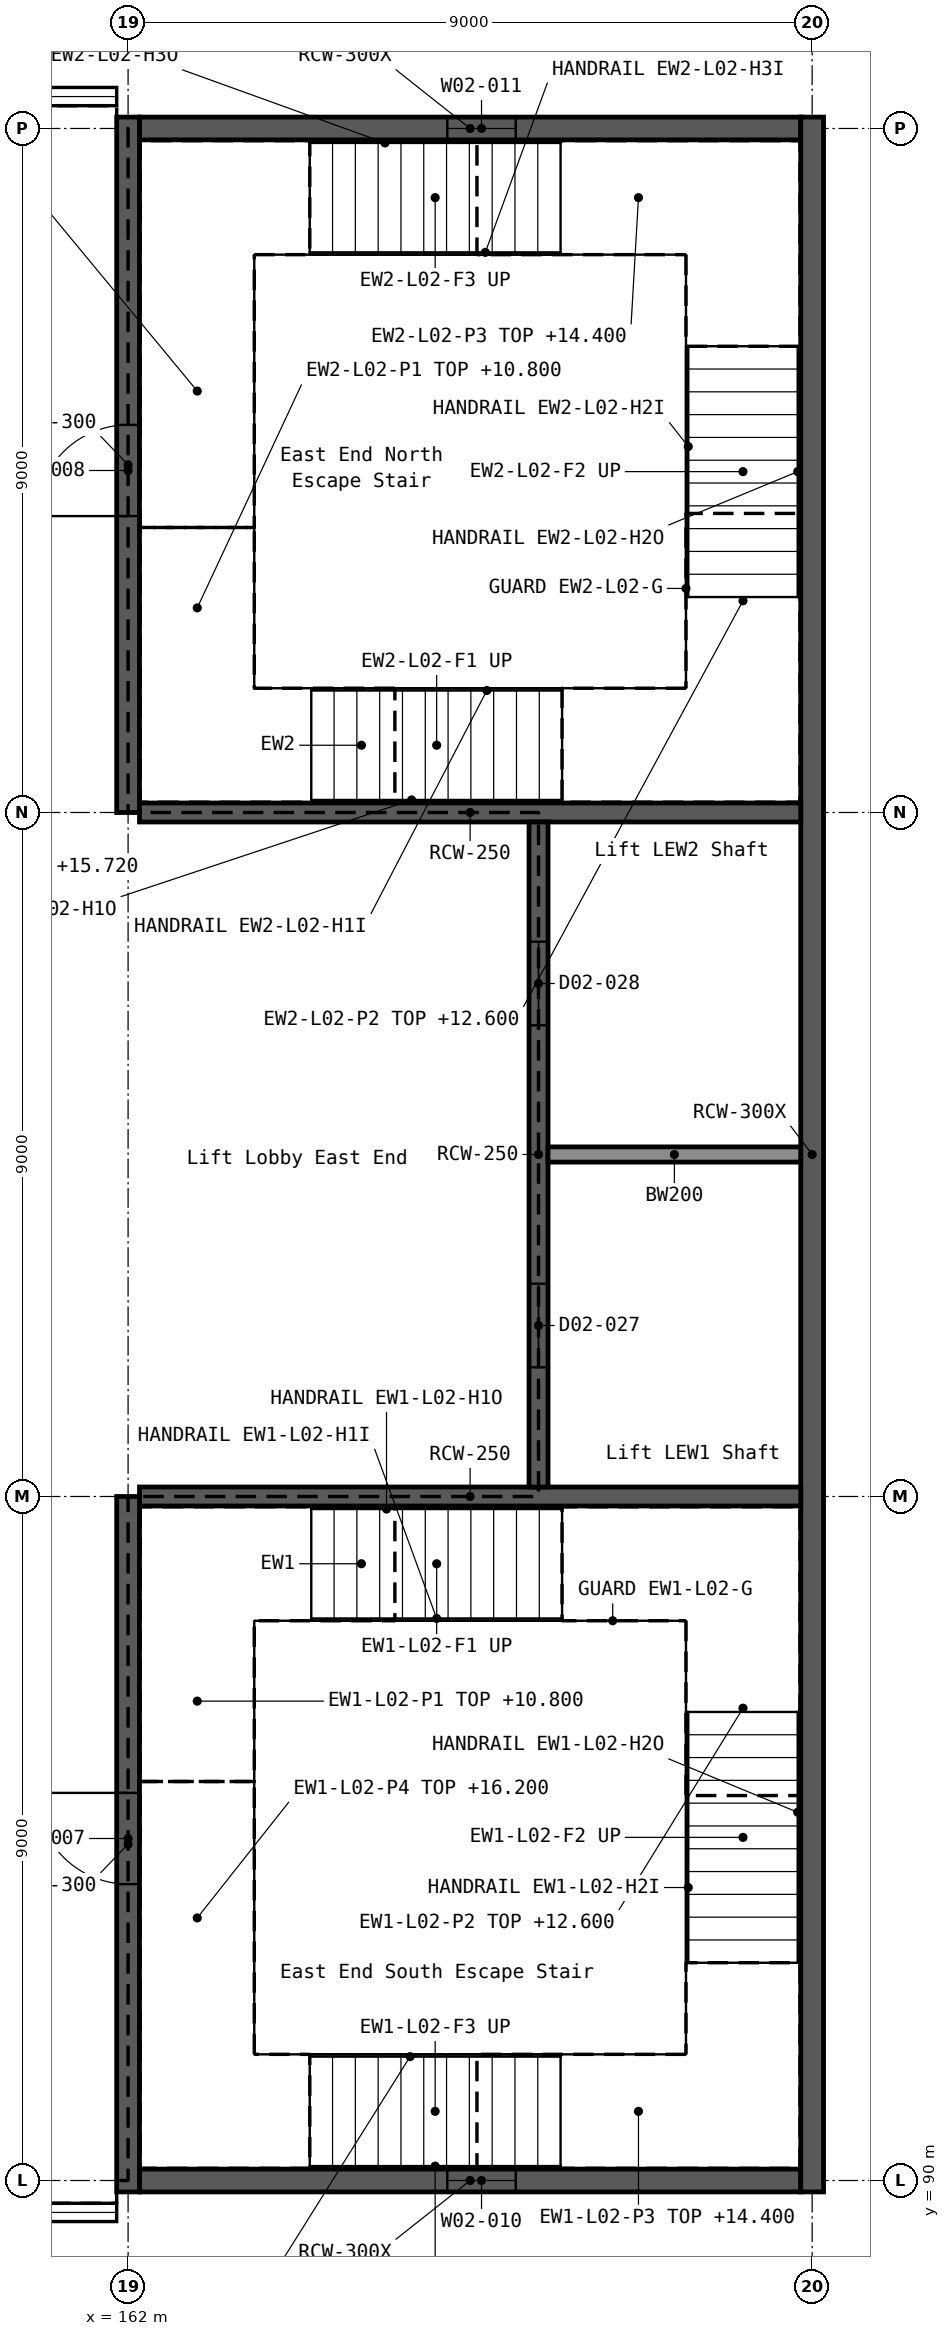
"""IFC4 building model, lengths in metres.
Left out: names, types, materials, properties, quantities, classifications, styles, units other than length and angle.
Written with IfcOpenShell. Run it as: python <this file> out.ifc"""

import sys

from ifc_helpers import new_model, si_unit, direction, frame, frame_2d, origin, place, context, subcontext, project, spatial, rectangle, extrude, element, fill, save


model = new_model("IFC4")
c1 = context("Model", 3, precision=1e-05, world=origin(), true_north=direction((0.0, 1.0)))
c2 = subcontext(c1, "Body", "Model", "MODEL_VIEW")
j1 = project(units=[si_unit("LENGTHUNIT", "METRE"), si_unit("PLANEANGLEUNIT", "RADIAN")], contexts=[c1])
p1 = place(None, origin())
s1 = spatial("IfcSite", under=j1, at=p1, CompositionType="ELEMENT")
p2 = place(p1, origin())
s2 = spatial("IfcBuilding", under=s1, at=p2, CompositionType="ELEMENT")
p3 = place(p2, frame((0.0, 0.0, 10.8)))
s3 = spatial("IfcBuildingStorey", under=s2, at=p3, CompositionType="ELEMENT", Elevation=10.8)
p4 = place(p3, frame((162.15, 90.0, 0.0), z_axis=(0.0, 0.0, 1.0), x_axis=(1.0, 0.0, 0.0)))
e1 = element("IfcWall", 1, at=p4, inside=s3, PredefinedType="SHEAR", context=c2, shape_type="SweptSolid", body=[
    extrude(rectangle(XDim=8.7, YDim=0.3, at=frame_2d((4.35, 0.0))), origin(), (0.0, 0.0, 1.0), 5.4),
])
p5 = place(p4, frame((4.05, 0.0, 1.5)))
e2 = element("IfcOpeningElement", 2, at=p5, cuts=e1, PredefinedType="OPENING", context=c2, shape_type="SweptSolid", body=[
    extrude(rectangle(XDim=0.9, YDim=1.2, at=frame_2d((0.45, 0.6))), frame((0.0, 0.161, 0.0), z_axis=(0.0, -1.0, 0.0), x_axis=(1.0, 0.0, 0.0)), (0.0, 0.0, 1.0), 0.322),
])
p6 = place(p3, frame((162.15, 117.0, 0.0), z_axis=(0.0, 0.0, 1.0), x_axis=(1.0, 0.0, 0.0)))
e3 = element("IfcWall", 3, at=p6, inside=s3, PredefinedType="SHEAR", context=c2, shape_type="SweptSolid", body=[
    extrude(rectangle(XDim=8.7, YDim=0.3, at=frame_2d((4.35, 0.0))), origin(), (0.0, 0.0, 1.0), 5.4),
])
p7 = place(p6, frame((4.05, 0.0, 1.5)))
e4 = element("IfcOpeningElement", 4, at=p7, cuts=e3, PredefinedType="OPENING", context=c2, shape_type="SweptSolid", body=[
    extrude(rectangle(XDim=0.9, YDim=1.2, at=frame_2d((0.45, 0.6))), frame((0.0, 0.161, 0.0), z_axis=(0.0, -1.0, 0.0), x_axis=(1.0, 0.0, 0.0)), (0.0, 0.0, 1.0), 0.322),
])
p8 = place(p3, frame((171.0, 89.85, 0.0), z_axis=(0.0, 0.0, 1.0), x_axis=(0.0, 1.0, 0.0)))
e5 = element("IfcWall", 5, at=p8, inside=s3, PredefinedType="SHEAR", context=c2, shape_type="SweptSolid", body=[
    extrude(rectangle(XDim=27.3, YDim=0.3, at=frame_2d((13.65, 0.0))), origin(), (0.0, 0.0, 1.0), 5.4),
])
for number, where, z_axis, x_axis in (
    (6, (162.15, 99.0, 0.0), (0.0, 0.0, 1.0), (1.0, 0.0, 0.0)),
    (7, (162.15, 108.0, 0.0), (0.0, 0.0, 1.0), (1.0, 0.0, 0.0)),
):
    element("IfcWall", number, at=place(p3, frame(where, z_axis=z_axis, x_axis=x_axis)), inside=s3, PredefinedType="SHEAR", context=c2, shape_type="SweptSolid", body=[
        extrude(rectangle(XDim=8.7, YDim=0.25, at=frame_2d((4.35, 0.0))), origin(), (0.0, 0.0, 1.0), 5.4),
    ])
p9 = place(p3, frame((167.4, 99.125, 0.0), z_axis=(0.0, 0.0, 1.0), x_axis=(0.0, 1.0, 0.0)))
e8 = element("IfcWall", 8, at=p9, inside=s3, PredefinedType="SHEAR", context=c2, shape_type="SweptSolid", body=[
    extrude(rectangle(XDim=8.75, YDim=0.25, at=frame_2d((4.375, 0.0))), origin(), (0.0, 0.0, 1.0), 5.4),
])
p10 = place(p9, frame((1.575, 0.0, 0.0)))
e9 = element("IfcOpeningElement", 9, at=p10, cuts=e8, PredefinedType="OPENING", context=c2, shape_type="SweptSolid", body=[
    extrude(rectangle(XDim=1.1, YDim=2.1, at=frame_2d((0.55, 1.05))), frame((0.0, 0.136, 0.0), z_axis=(0.0, -1.0, 0.0), x_axis=(1.0, 0.0, 0.0)), (0.0, 0.0, 1.0), 0.272),
])
p11 = place(p9, frame((6.075, 0.0, 0.0)))
e10 = element("IfcOpeningElement", 10, at=p11, cuts=e8, PredefinedType="OPENING", context=c2, shape_type="SweptSolid", body=[
    extrude(rectangle(XDim=1.1, YDim=2.1, at=frame_2d((0.55, 1.05))), frame((0.0, 0.136, 0.0), z_axis=(0.0, -1.0, 0.0), x_axis=(1.0, 0.0, 0.0)), (0.0, 0.0, 1.0), 0.272),
])
p12 = place(p3, frame((162.0, 89.85, 0.0), z_axis=(0.0, 0.0, 1.0), x_axis=(0.0, 1.0, 0.0)))
e11 = element("IfcWall", 11, at=p12, inside=s3, PredefinedType="SHEAR", context=c2, shape_type="SweptSolid", body=[
    extrude(rectangle(XDim=9.15, YDim=0.3, at=frame_2d((4.575, 0.0))), origin(), (0.0, 0.0, 1.0), 5.4),
])
p13 = place(p12, frame((4.05, 0.0, 0.0)))
e12 = element("IfcOpeningElement", 12, at=p13, cuts=e11, PredefinedType="OPENING", context=c2, shape_type="SweptSolid", body=[
    extrude(rectangle(XDim=1.2, YDim=2.1, at=frame_2d((0.6, 1.05))), frame((0.0, 0.161, 0.0), z_axis=(0.0, -1.0, 0.0), x_axis=(1.0, 0.0, 0.0)), (0.0, 0.0, 1.0), 0.322),
])
p14 = place(p3, frame((162.0, 108.0, 0.0), z_axis=(0.0, 0.0, 1.0), x_axis=(0.0, 1.0, 0.0)))
e13 = element("IfcWall", 13, at=p14, inside=s3, PredefinedType="SHEAR", context=c2, shape_type="SweptSolid", body=[
    extrude(rectangle(XDim=9.15, YDim=0.3, at=frame_2d((4.575, 0.0))), origin(), (0.0, 0.0, 1.0), 5.4),
])
p15 = place(p14, frame((3.9, 0.0, 0.0)))
e14 = element("IfcOpeningElement", 14, at=p15, cuts=e13, PredefinedType="OPENING", context=c2, shape_type="SweptSolid", body=[
    extrude(rectangle(XDim=1.2, YDim=2.1, at=frame_2d((0.6, 1.05))), frame((0.0, 0.161, 0.0), z_axis=(0.0, -1.0, 0.0), x_axis=(1.0, 0.0, 0.0)), (0.0, 0.0, 1.0), 0.322),
])
p16 = place(p3, frame((167.525, 103.5, 0.0), z_axis=(0.0, 0.0, 1.0), x_axis=(1.0, 0.0, 0.0)))
e15 = element("IfcWall", 15, at=p16, inside=s3, PredefinedType="SOLIDWALL", context=c2, shape_type="SweptSolid", body=[
    extrude(rectangle(XDim=3.325, YDim=0.2, at=frame_2d((1.663, 0.0))), origin(), (0.0, 0.0, 1.0), 5.4),
])
p17 = place(p5, origin())
e16 = element("IfcWindow", 16, at=p17, inside=s3, PartitioningType="SINGLE_PANEL", PredefinedType="WINDOW", context=c2, shape_type="SweptSolid", body=[
    extrude(rectangle(XDim=0.9, YDim=1.2, at=frame_2d((0.45, 0.6))), frame((0.0, 0.03, 0.0), z_axis=(0.0, -1.0, 0.0), x_axis=(1.0, 0.0, 0.0)), (0.0, 0.0, 1.0), 0.06),
])
fill(e2, e16)
p18 = place(p7, origin())
e17 = element("IfcWindow", 17, at=p18, inside=s3, PartitioningType="SINGLE_PANEL", PredefinedType="WINDOW", context=c2, shape_type="SweptSolid", body=[
    extrude(rectangle(XDim=0.9, YDim=1.2, at=frame_2d((0.45, 0.6))), frame((0.0, 0.03, 0.0), z_axis=(0.0, -1.0, 0.0), x_axis=(1.0, 0.0, 0.0)), (0.0, 0.0, 1.0), 0.06),
])
fill(e4, e17)
p19 = place(p13, origin())
e18 = element("IfcDoor", 18, at=p19, inside=s3, OperationType="SINGLE_SWING_RIGHT", PredefinedType="DOOR", context=c2, shape_type="SweptSolid", body=[
    extrude(rectangle(XDim=1.2, YDim=2.1, at=frame_2d((0.6, 1.05))), frame((0.0, 0.025, 0.0), z_axis=(0.0, -1.0, 0.0), x_axis=(1.0, 0.0, 0.0)), (0.0, 0.0, 1.0), 0.05),
])
fill(e12, e18)
p20 = place(p15, origin())
e19 = element("IfcDoor", 19, at=p20, inside=s3, OperationType="SINGLE_SWING_LEFT", PredefinedType="DOOR", context=c2, shape_type="SweptSolid", body=[
    extrude(rectangle(XDim=1.2, YDim=2.1, at=frame_2d((0.6, 1.05))), frame((0.0, 0.025, 0.0), z_axis=(0.0, -1.0, 0.0), x_axis=(1.0, 0.0, 0.0)), (0.0, 0.0, 1.0), 0.05),
])
fill(e14, e19)
p21 = place(p10, origin())
e20 = element("IfcDoor", 20, at=p21, inside=s3, OperationType="DOUBLE_DOOR_SLIDING", PredefinedType="DOOR", context=c2, shape_type="SweptSolid", body=[
    extrude(rectangle(XDim=1.1, YDim=2.1, at=frame_2d((0.55, 1.05))), frame((0.0, 0.025, 0.0), z_axis=(0.0, -1.0, 0.0), x_axis=(1.0, 0.0, 0.0)), (0.0, 0.0, 1.0), 0.05),
])
fill(e9, e20)
p22 = place(p11, origin())
e21 = element("IfcDoor", 21, at=p22, inside=s3, OperationType="DOUBLE_DOOR_SLIDING", PredefinedType="DOOR", context=c2, shape_type="SweptSolid", body=[
    extrude(rectangle(XDim=1.1, YDim=2.1, at=frame_2d((0.55, 1.05))), frame((0.0, 0.025, 0.0), z_axis=(0.0, -1.0, 0.0), x_axis=(1.0, 0.0, 0.0)), (0.0, 0.0, 1.0), 0.05),
])
fill(e10, e21)
save(model, sys.argv[1])
